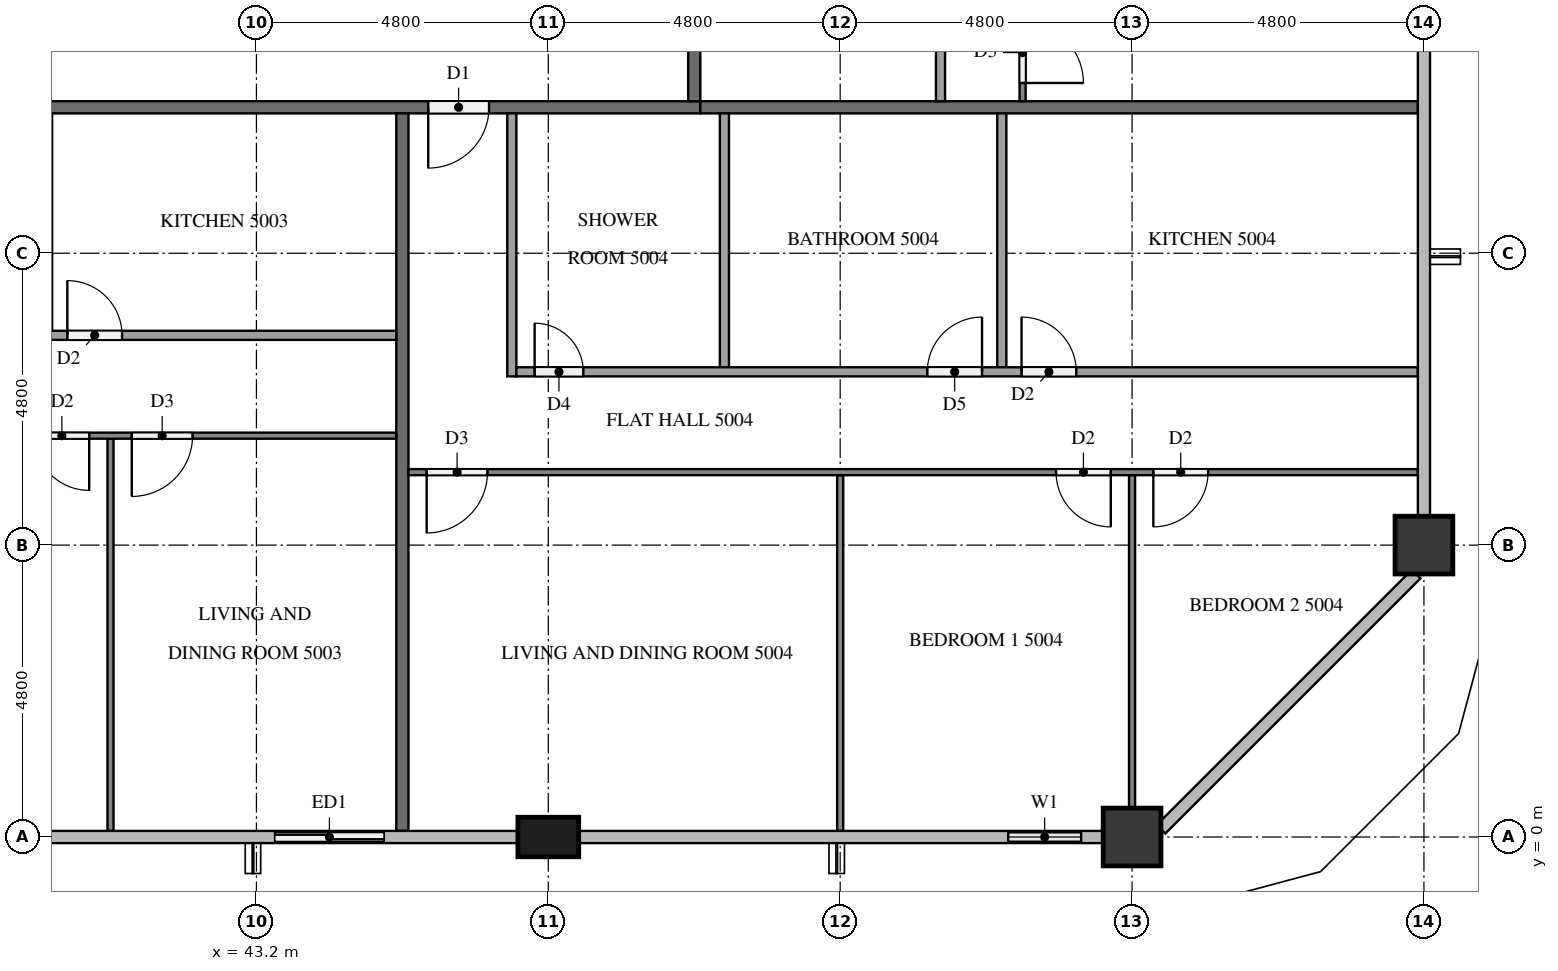
"""IFC4 building model, lengths in metres.
Left out: names, types, materials, properties, quantities, classifications, styles, units other than length and angle.
Written with IfcOpenShell. Run it as: python <this file> out.ifc"""

import sys

from ifc_helpers import new_model, si_unit, direction, frame, frame_2d, origin, origin_2d, place, context, subcontext, project, spatial, rectangle, extrude, element, fill, save


model = new_model("IFC4")
c1 = context("Model", 3, precision=1e-05, world=origin(), true_north=direction((0.0, 1.0)))
c2 = subcontext(c1, "Body", "Model", "MODEL_VIEW")
j1 = project(units=[si_unit("LENGTHUNIT", "METRE"), si_unit("PLANEANGLEUNIT", "RADIAN")], contexts=[c1])
p1 = place(None, origin())
s1 = spatial("IfcSite", under=j1, at=p1, CompositionType="ELEMENT")
p2 = place(p1, origin())
s2 = spatial("IfcBuilding", under=s1, at=p2, CompositionType="ELEMENT")
p3 = place(p2, frame((0.0, 0.0, 192.9)))
s3 = spatial("IfcBuildingStorey", under=s2, at=p3, CompositionType="ELEMENT", Elevation=192.9)
p4 = place(p3, frame((48.0, 0.0, 0.0), z_axis=(0.0, 0.0, 1.0), x_axis=(1.0, 0.0, 0.0)))
e1 = element("IfcColumn", 1, at=p4, inside=s3, PredefinedType="COLUMN", context=c2, shape_type="SweptSolid", body=[
    extrude(rectangle(XDim=1.0, YDim=0.65, at=origin_2d()), origin(), (0.0, 0.0, 1.0), 3.2),
])
for number, where, z_axis, x_axis in (
    (2, (57.6, 0.0, 0.0), (0.0, 0.0, 1.0), (1.0, 0.0, 0.0)),
    (3, (62.4, 4.8, 0.0), (0.0, 0.0, 1.0), (1.0, 0.0, 0.0)),
):
    element("IfcColumn", number, at=place(p3, frame(where, z_axis=z_axis, x_axis=x_axis)), inside=s3, PredefinedType="COLUMN", context=c2, shape_type="SweptSolid", body=[
        extrude(rectangle(XDim=0.95, YDim=0.95, at=origin_2d()), origin(), (0.0, 0.0, 1.0), 3.2),
    ])
p5 = place(p3, frame((43.2, 0.0, 0.0), z_axis=(0.0, 0.0, 1.0), x_axis=(1.0, 0.0, 0.0)))
e4 = element("IfcWall", 4, at=p5, inside=s3, PredefinedType="SOLIDWALL", context=c2, shape_type="SweptSolid", body=[
    extrude(rectangle(XDim=2.4, YDim=0.15, at=frame_2d((1.2, 0.0))), origin(), (0.0, 0.0, 1.0), 3.2),
])
p6 = place(p5, frame((0.3, 0.0, 0.0)))
e5 = element("IfcOpeningElement", 5, at=p6, cuts=e4, PredefinedType="OPENING", context=c2, shape_type="SweptSolid", body=[
    extrude(rectangle(XDim=1.8, YDim=2.4, at=frame_2d((0.9, 1.2))), frame((0.0, 0.085, 0.0), z_axis=(0.0, -1.0, 0.0), x_axis=(1.0, 0.0, 0.0)), (0.0, 0.0, 1.0), 0.17),
])
p7 = place(p3, frame((55.2, 0.0, 0.0), z_axis=(0.0, 0.0, 1.0), x_axis=(1.0, 0.0, 0.0)))
e6 = element("IfcWall", 6, at=p7, inside=s3, PredefinedType="SOLIDWALL", context=c2, shape_type="SweptSolid", body=[
    extrude(rectangle(XDim=1.925, YDim=0.15, at=frame_2d((0.962, 0.0))), origin(), (0.0, 0.0, 1.0), 3.2),
])
p8 = place(p7, frame((0.363, 0.0, 0.9)))
e7 = element("IfcOpeningElement", 7, at=p8, cuts=e6, PredefinedType="OPENING", context=c2, shape_type="SweptSolid", body=[
    extrude(rectangle(XDim=1.2, YDim=1.4, at=frame_2d((0.6, 0.7))), frame((0.0, 0.085, 0.0), z_axis=(0.0, -1.0, 0.0), x_axis=(1.0, 0.0, 0.0)), (0.0, 0.0, 1.0), 0.17),
])
p9 = place(p3, frame((50.5, 12.0, 0.0), z_axis=(0.0, 0.0, 1.0), x_axis=(-1.0, 0.0, 0.0)))
e8 = element("IfcWall", 8, at=p9, inside=s3, PredefinedType="PARTITIONING", context=c2, shape_type="SweptSolid", body=[
    extrude(rectangle(XDim=38.6, YDim=0.2, at=frame_2d((19.3, 0.0))), origin(), (0.0, 0.0, 1.0), 3.2),
])
p10 = place(p9, frame((31.725, 0.0, 0.0)))
e9 = element("IfcOpeningElement", 9, at=p10, cuts=e8, PredefinedType="OPENING", context=c2, shape_type="SweptSolid", body=[
    extrude(rectangle(XDim=1.0, YDim=2.1, at=frame_2d((0.5, 1.05))), frame((0.0, 0.11, 0.0), z_axis=(0.0, -1.0, 0.0), x_axis=(1.0, 0.0, 0.0)), (0.0, 0.0, 1.0), 0.22),
])
p11 = place(p9, frame((19.725, 0.0, 0.0)))
e10 = element("IfcOpeningElement", 10, at=p11, cuts=e8, PredefinedType="OPENING", context=c2, shape_type="SweptSolid", body=[
    extrude(rectangle(XDim=1.0, YDim=2.1, at=frame_2d((0.5, 1.05))), frame((0.0, 0.11, 0.0), z_axis=(0.0, -1.0, 0.0), x_axis=(1.0, 0.0, 0.0)), (0.0, 0.0, 1.0), 0.22),
])
p12 = place(p9, frame((17.875, 0.0, 0.0)))
e11 = element("IfcOpeningElement", 11, at=p12, cuts=e8, PredefinedType="OPENING", context=c2, shape_type="SweptSolid", body=[
    extrude(rectangle(XDim=1.0, YDim=2.1, at=frame_2d((0.5, 1.05))), frame((0.0, 0.11, 0.0), z_axis=(0.0, -1.0, 0.0), x_axis=(1.0, 0.0, 0.0)), (0.0, 0.0, 1.0), 0.22),
])
p13 = place(p9, frame((3.475, 0.0, 0.0)))
e12 = element("IfcOpeningElement", 12, at=p13, cuts=e8, PredefinedType="OPENING", context=c2, shape_type="SweptSolid", body=[
    extrude(rectangle(XDim=1.0, YDim=2.1, at=frame_2d((0.5, 1.05))), frame((0.0, 0.11, 0.0), z_axis=(0.0, -1.0, 0.0), x_axis=(1.0, 0.0, 0.0)), (0.0, 0.0, 1.0), 0.22),
])
p14 = place(p3, frame((50.4, 40.7, 0.0), z_axis=(0.0, 0.0, 1.0), x_axis=(0.0, -1.0, 0.0)))
e13 = element("IfcWall", 13, at=p14, inside=s3, PredefinedType="PARTITIONING", context=c2, shape_type="SweptSolid", body=[
    extrude(rectangle(XDim=28.6, YDim=0.2, at=frame_2d((14.3, 0.0))), origin(), (0.0, 0.0, 1.0), 3.2),
])
p15 = place(p14, frame((21.925, 0.0, 0.0)))
e14 = element("IfcOpeningElement", 14, at=p15, cuts=e13, PredefinedType="OPENING", context=c2, shape_type="SweptSolid", body=[
    extrude(rectangle(XDim=1.0, YDim=2.1, at=frame_2d((0.5, 1.05))), frame((0.0, 0.11, 0.0), z_axis=(0.0, -1.0, 0.0), x_axis=(1.0, 0.0, 0.0)), (0.0, 0.0, 1.0), 0.22),
])
p16 = place(p14, frame((20.075, 0.0, 0.0)))
e15 = element("IfcOpeningElement", 15, at=p16, cuts=e13, PredefinedType="OPENING", context=c2, shape_type="SweptSolid", body=[
    extrude(rectangle(XDim=1.0, YDim=2.1, at=frame_2d((0.5, 1.05))), frame((0.0, 0.11, 0.0), z_axis=(0.0, -1.0, 0.0), x_axis=(1.0, 0.0, 0.0)), (0.0, 0.0, 1.0), 0.22),
])
p17 = place(p14, frame((0.325, 0.0, 0.0)))
e16 = element("IfcOpeningElement", 16, at=p17, cuts=e13, PredefinedType="OPENING", context=c2, shape_type="SweptSolid", body=[
    extrude(rectangle(XDim=1.0, YDim=2.1, at=frame_2d((0.5, 1.05))), frame((0.0, 0.11, 0.0), z_axis=(0.0, -1.0, 0.0), x_axis=(1.0, 0.0, 0.0)), (0.0, 0.0, 1.0), 0.22),
])
p18 = place(p3, frame((45.6, 11.9, 0.0), z_axis=(0.0, 0.0, 1.0), x_axis=(0.0, -1.0, 0.0)))
e17 = element("IfcWall", 17, at=p18, inside=s3, PredefinedType="PARTITIONING", context=c2, shape_type="SweptSolid", body=[
    extrude(rectangle(XDim=11.8, YDim=0.2, at=frame_2d((5.9, 0.0))), origin(), (0.0, 0.0, 1.0), 3.2),
])
p19 = place(p3, frame((50.5, 12.0, 0.0), z_axis=(0.0, 0.0, 1.0), x_axis=(1.0, 0.0, 0.0)))
e18 = element("IfcWall", 18, at=p19, inside=s3, PredefinedType="PARTITIONING", context=c2, shape_type="SweptSolid", body=[
    extrude(rectangle(XDim=11.8, YDim=0.2, at=frame_2d((5.9, 0.0))), origin(), (0.0, 0.0, 1.0), 3.2),
])
p20 = place(p3, frame((40.8, 6.55, 0.0), z_axis=(0.0, 0.0, 1.0), x_axis=(0.0, -1.0, 0.0)))
e19 = element("IfcWall", 19, at=p20, inside=s3, PredefinedType="PARTITIONING", context=c2, shape_type="SweptSolid", body=[
    extrude(rectangle(XDim=6.45, YDim=0.1, at=frame_2d((3.225, 0.0))), origin(), (0.0, 0.0, 1.0), 3.2),
])
p21 = place(p3, frame((45.5, 6.6, 0.0), z_axis=(0.0, 0.0, 1.0), x_axis=(-1.0, 0.0, 0.0)))
e20 = element("IfcWall", 20, at=p21, inside=s3, PredefinedType="PARTITIONING", context=c2, shape_type="SweptSolid", body=[
    extrude(rectangle(XDim=14.2, YDim=0.1, at=frame_2d((7.1, 0.0))), origin(), (0.0, 0.0, 1.0), 3.2),
])
p22 = place(p21, frame((13.0, 0.0, 0.0)))
e21 = element("IfcOpeningElement", 21, at=p22, cuts=e20, PredefinedType="OPENING", context=c2, shape_type="SweptSolid", body=[
    extrude(rectangle(XDim=0.9, YDim=2.1, at=frame_2d((0.45, 1.05))), frame((0.0, 0.06, 0.0), z_axis=(0.0, -1.0, 0.0), x_axis=(1.0, 0.0, 0.0)), (0.0, 0.0, 1.0), 0.12),
])
p23 = place(p21, frame((5.05, 0.0, 0.0)))
e22 = element("IfcOpeningElement", 22, at=p23, cuts=e20, PredefinedType="OPENING", context=c2, shape_type="SweptSolid", body=[
    extrude(rectangle(XDim=0.9, YDim=2.1, at=frame_2d((0.45, 1.05))), frame((0.0, 0.06, 0.0), z_axis=(0.0, -1.0, 0.0), x_axis=(1.0, 0.0, 0.0)), (0.0, 0.0, 1.0), 0.12),
])
p24 = place(p21, frame((3.35, 0.0, 0.0)))
e23 = element("IfcOpeningElement", 23, at=p24, cuts=e20, PredefinedType="OPENING", context=c2, shape_type="SweptSolid", body=[
    extrude(rectangle(XDim=1.0, YDim=2.1, at=frame_2d((0.5, 1.05))), frame((0.0, 0.06, 0.0), z_axis=(0.0, -1.0, 0.0), x_axis=(1.0, 0.0, 0.0)), (0.0, 0.0, 1.0), 0.12),
])
p25 = place(p3, frame((33.075, 8.25, 0.0), z_axis=(0.0, 0.0, 1.0), x_axis=(1.0, 0.0, 0.0)))
e24 = element("IfcWall", 24, at=p25, inside=s3, PredefinedType="PARTITIONING", context=c2, shape_type="SweptSolid", body=[
    extrude(rectangle(XDim=12.425, YDim=0.15, at=frame_2d((6.212, 0.0))), origin(), (0.0, 0.0, 1.0), 3.2),
])
p26 = place(p25, frame((0.3, 0.0, 0.0)))
e25 = element("IfcOpeningElement", 25, at=p26, cuts=e24, PredefinedType="OPENING", context=c2, shape_type="SweptSolid", body=[
    extrude(rectangle(XDim=0.9, YDim=2.1, at=frame_2d((0.45, 1.05))), frame((0.0, 0.085, 0.0), z_axis=(0.0, -1.0, 0.0), x_axis=(1.0, 0.0, 0.0)), (0.0, 0.0, 1.0), 0.17),
])
p27 = place(p25, frame((5.565, 0.0, 0.0)))
e26 = element("IfcOpeningElement", 26, at=p27, cuts=e24, PredefinedType="OPENING", context=c2, shape_type="SweptSolid", body=[
    extrude(rectangle(XDim=0.8, YDim=2.1, at=frame_2d((0.4, 1.05))), frame((0.0, 0.085, 0.0), z_axis=(0.0, -1.0, 0.0), x_axis=(1.0, 0.0, 0.0)), (0.0, 0.0, 1.0), 0.17),
])
p28 = place(p25, frame((7.015, 0.0, 0.0)))
e27 = element("IfcOpeningElement", 27, at=p28, cuts=e24, PredefinedType="OPENING", context=c2, shape_type="SweptSolid", body=[
    extrude(rectangle(XDim=0.9, YDim=2.1, at=frame_2d((0.45, 1.05))), frame((0.0, 0.085, 0.0), z_axis=(0.0, -1.0, 0.0), x_axis=(1.0, 0.0, 0.0)), (0.0, 0.0, 1.0), 0.17),
])
p29 = place(p3, frame((52.8, 5.95, 0.0), z_axis=(0.0, 0.0, 1.0), x_axis=(0.0, -1.0, 0.0)))
e28 = element("IfcWall", 28, at=p29, inside=s3, PredefinedType="PARTITIONING", context=c2, shape_type="SweptSolid", body=[
    extrude(rectangle(XDim=5.85, YDim=0.1, at=frame_2d((2.925, 0.0))), origin(), (0.0, 0.0, 1.0), 3.2),
])
p30 = place(p3, frame((57.6, 5.95, 0.0), z_axis=(0.0, 0.0, 1.0), x_axis=(0.0, -1.0, 0.0)))
e29 = element("IfcWall", 29, at=p30, inside=s3, PredefinedType="PARTITIONING", context=c2, shape_type="SweptSolid", body=[
    extrude(rectangle(XDim=5.475, YDim=0.1, at=frame_2d((2.737, 0.0))), origin(), (0.0, 0.0, 1.0), 3.2),
])
p31 = place(p3, frame((62.3, 6.0, 0.0), z_axis=(0.0, 0.0, 1.0), x_axis=(-1.0, 0.0, 0.0)))
e30 = element("IfcWall", 30, at=p31, inside=s3, PredefinedType="PARTITIONING", context=c2, shape_type="SweptSolid", body=[
    extrude(rectangle(XDim=16.6, YDim=0.1, at=frame_2d((8.3, 0.0))), origin(), (0.0, 0.0, 1.0), 3.2),
])
p32 = place(p31, frame((15.3, 0.0, 0.0)))
e31 = element("IfcOpeningElement", 31, at=p32, cuts=e30, PredefinedType="OPENING", context=c2, shape_type="SweptSolid", body=[
    extrude(rectangle(XDim=1.0, YDim=2.1, at=frame_2d((0.5, 1.05))), frame((0.0, 0.06, 0.0), z_axis=(0.0, -1.0, 0.0), x_axis=(1.0, 0.0, 0.0)), (0.0, 0.0, 1.0), 0.12),
])
p33 = place(p31, frame((5.05, 0.0, 0.0)))
e32 = element("IfcOpeningElement", 32, at=p33, cuts=e30, PredefinedType="OPENING", context=c2, shape_type="SweptSolid", body=[
    extrude(rectangle(XDim=0.9, YDim=2.1, at=frame_2d((0.45, 1.05))), frame((0.0, 0.06, 0.0), z_axis=(0.0, -1.0, 0.0), x_axis=(1.0, 0.0, 0.0)), (0.0, 0.0, 1.0), 0.12),
])
p34 = place(p31, frame((3.45, 0.0, 0.0)))
e33 = element("IfcOpeningElement", 33, at=p34, cuts=e30, PredefinedType="OPENING", context=c2, shape_type="SweptSolid", body=[
    extrude(rectangle(XDim=0.9, YDim=2.1, at=frame_2d((0.45, 1.05))), frame((0.0, 0.06, 0.0), z_axis=(0.0, -1.0, 0.0), x_axis=(1.0, 0.0, 0.0)), (0.0, 0.0, 1.0), 0.12),
])
for number, where, z_axis, x_axis in (
    (34, (50.896, 11.9, 0.0), (0.0, 0.0, 1.0), (0.0, -1.0, 0.0)),
    (35, (55.458, 11.9, 0.0), (0.0, 0.0, 1.0), (0.0, -1.0, 0.0)),
):
    element("IfcWall", number, at=place(p3, frame(where, z_axis=z_axis, x_axis=x_axis)), inside=s3, PredefinedType="PARTITIONING", context=c2, shape_type="SweptSolid", body=[
        extrude(rectangle(XDim=4.175, YDim=0.15, at=frame_2d((2.087, 0.0))), origin(), (0.0, 0.0, 1.0), 3.2),
    ])
p35 = place(p3, frame((47.4, 11.9, 0.0), z_axis=(0.0, 0.0, 1.0), x_axis=(0.0, -1.0, 0.0)))
e36 = element("IfcWall", 36, at=p35, inside=s3, PredefinedType="PARTITIONING", context=c2, shape_type="SweptSolid", body=[
    extrude(rectangle(XDim=4.325, YDim=0.15, at=frame_2d((2.163, 0.0))), origin(), (0.0, 0.0, 1.0), 3.2),
])
p36 = place(p3, frame((47.475, 7.65, 0.0), z_axis=(0.0, 0.0, 1.0), x_axis=(1.0, 0.0, 0.0)))
e37 = element("IfcWall", 37, at=p36, inside=s3, PredefinedType="PARTITIONING", context=c2, shape_type="SweptSolid", body=[
    extrude(rectangle(XDim=14.825, YDim=0.15, at=frame_2d((7.413, 0.0))), origin(), (0.0, 0.0, 1.0), 3.2),
])
p37 = place(p36, frame((0.3, 0.0, 0.0)))
e38 = element("IfcOpeningElement", 38, at=p37, cuts=e37, PredefinedType="OPENING", context=c2, shape_type="SweptSolid", body=[
    extrude(rectangle(XDim=0.8, YDim=2.1, at=frame_2d((0.4, 1.05))), frame((0.0, 0.085, 0.0), z_axis=(0.0, -1.0, 0.0), x_axis=(1.0, 0.0, 0.0)), (0.0, 0.0, 1.0), 0.17),
])
p38 = place(p36, frame((6.758, 0.0, 0.0)))
e39 = element("IfcOpeningElement", 39, at=p38, cuts=e37, PredefinedType="OPENING", context=c2, shape_type="SweptSolid", body=[
    extrude(rectangle(XDim=0.9, YDim=2.1, at=frame_2d((0.45, 1.05))), frame((0.0, 0.085, 0.0), z_axis=(0.0, -1.0, 0.0), x_axis=(1.0, 0.0, 0.0)), (0.0, 0.0, 1.0), 0.17),
])
p39 = place(p36, frame((8.308, 0.0, 0.0)))
e40 = element("IfcOpeningElement", 40, at=p39, cuts=e37, PredefinedType="OPENING", context=c2, shape_type="SweptSolid", body=[
    extrude(rectangle(XDim=0.9, YDim=2.1, at=frame_2d((0.45, 1.05))), frame((0.0, 0.085, 0.0), z_axis=(0.0, -1.0, 0.0), x_axis=(1.0, 0.0, 0.0)), (0.0, 0.0, 1.0), 0.17),
])
p40 = place(p3, frame((55.8, 19.1, 0.0), z_axis=(0.0, 0.0, 1.0), x_axis=(0.0, -1.0, 0.0)))
e41 = element("IfcWall", 41, at=p40, inside=s3, PredefinedType="PARTITIONING", context=c2, shape_type="SweptSolid", body=[
    extrude(rectangle(XDim=7.0, YDim=0.1, at=frame_2d((3.5, 0.0))), origin(), (0.0, 0.0, 1.0), 3.2),
])
p41 = place(p40, frame((5.7, 0.0, 0.0)))
e42 = element("IfcOpeningElement", 42, at=p41, cuts=e41, PredefinedType="OPENING", context=c2, shape_type="SweptSolid", body=[
    extrude(rectangle(XDim=1.0, YDim=2.1, at=frame_2d((0.5, 1.05))), frame((0.0, 0.06, 0.0), z_axis=(0.0, -1.0, 0.0), x_axis=(1.0, 0.0, 0.0)), (0.0, 0.0, 1.0), 0.12),
])
p42 = place(p3, frame((54.45, 12.1, 0.0), z_axis=(0.0, 0.0, 1.0), x_axis=(0.0, 1.0, 0.0)))
e43 = element("IfcWall", 43, at=p42, inside=s3, PredefinedType="PARTITIONING", context=c2, shape_type="SweptSolid", body=[
    extrude(rectangle(XDim=5.225, YDim=0.15, at=frame_2d((2.612, 0.0))), origin(), (0.0, 0.0, 1.0), 3.2),
])
p43 = place(p42, frame((3.46, 0.0, 0.0)))
e44 = element("IfcOpeningElement", 44, at=p43, cuts=e43, PredefinedType="OPENING", context=c2, shape_type="SweptSolid", body=[
    extrude(rectangle(XDim=0.8, YDim=2.1, at=frame_2d((0.4, 1.05))), frame((0.0, 0.085, 0.0), z_axis=(0.0, -1.0, 0.0), x_axis=(1.0, 0.0, 0.0)), (0.0, 0.0, 1.0), 0.17),
])
p44 = place(p42, frame((1.91, 0.0, 0.0)))
e45 = element("IfcOpeningElement", 45, at=p44, cuts=e43, PredefinedType="OPENING", context=c2, shape_type="SweptSolid", body=[
    extrude(rectangle(XDim=0.9, YDim=2.1, at=frame_2d((0.45, 1.05))), frame((0.0, 0.085, 0.0), z_axis=(0.0, -1.0, 0.0), x_axis=(1.0, 0.0, 0.0)), (0.0, 0.0, 1.0), 0.17),
])
p45 = place(p6, origin())
e46 = element("IfcDoor", 46, at=p45, inside=s3, OperationType="SLIDING_TO_LEFT", PredefinedType="DOOR", context=c2, shape_type="SweptSolid", body=[
    extrude(rectangle(XDim=1.8, YDim=2.4, at=frame_2d((0.9, 1.2))), frame((0.0, 0.025, 0.0), z_axis=(0.0, -1.0, 0.0), x_axis=(1.0, 0.0, 0.0)), (0.0, 0.0, 1.0), 0.05),
])
fill(e5, e46)
p46 = place(p8, origin())
e47 = element("IfcWindow", 47, at=p46, inside=s3, PartitioningType="SINGLE_PANEL", PredefinedType="WINDOW", context=c2, shape_type="SweptSolid", body=[
    extrude(rectangle(XDim=1.2, YDim=1.4, at=frame_2d((0.6, 0.7))), frame((0.0, 0.03, 0.0), z_axis=(0.0, -1.0, 0.0), x_axis=(1.0, 0.0, 0.0)), (0.0, 0.0, 1.0), 0.06),
])
fill(e7, e47)
p47 = place(p13, origin())
e48 = element("IfcDoor", 48, at=p47, inside=s3, OperationType="SINGLE_SWING_RIGHT", PredefinedType="DOOR", context=c2, shape_type="SweptSolid", body=[
    extrude(rectangle(XDim=1.0, YDim=2.1, at=frame_2d((0.5, 1.05))), frame((0.0, 0.025, 0.0), z_axis=(0.0, -1.0, 0.0), x_axis=(1.0, 0.0, 0.0)), (0.0, 0.0, 1.0), 0.05),
])
fill(e12, e48)
p48 = place(p23, origin())
e49 = element("IfcDoor", 49, at=p48, inside=s3, OperationType="SINGLE_SWING_LEFT", PredefinedType="DOOR", context=c2, shape_type="SweptSolid", body=[
    extrude(rectangle(XDim=0.9, YDim=2.1, at=frame_2d((0.45, 1.05))), frame((0.0, 0.025, 0.0), z_axis=(0.0, -1.0, 0.0), x_axis=(1.0, 0.0, 0.0)), (0.0, 0.0, 1.0), 0.05),
])
fill(e22, e49)
p49 = place(p24, origin())
e50 = element("IfcDoor", 50, at=p49, inside=s3, OperationType="SINGLE_SWING_RIGHT", PredefinedType="DOOR", context=c2, shape_type="SweptSolid", body=[
    extrude(rectangle(XDim=1.0, YDim=2.1, at=frame_2d((0.5, 1.05))), frame((0.0, 0.025, 0.0), z_axis=(0.0, -1.0, 0.0), x_axis=(1.0, 0.0, 0.0)), (0.0, 0.0, 1.0), 0.05),
])
fill(e23, e50)
p50 = place(p28, origin())
e51 = element("IfcDoor", 51, at=p50, inside=s3, OperationType="SINGLE_SWING_LEFT", PredefinedType="DOOR", context=c2, shape_type="SweptSolid", body=[
    extrude(rectangle(XDim=0.9, YDim=2.1, at=frame_2d((0.45, 1.05))), frame((0.0, 0.025, 0.0), z_axis=(0.0, -1.0, 0.0), x_axis=(1.0, 0.0, 0.0)), (0.0, 0.0, 1.0), 0.05),
])
fill(e27, e51)
p51 = place(p32, origin())
e52 = element("IfcDoor", 52, at=p51, inside=s3, OperationType="SINGLE_SWING_RIGHT", PredefinedType="DOOR", context=c2, shape_type="SweptSolid", body=[
    extrude(rectangle(XDim=1.0, YDim=2.1, at=frame_2d((0.5, 1.05))), frame((0.0, 0.025, 0.0), z_axis=(0.0, -1.0, 0.0), x_axis=(1.0, 0.0, 0.0)), (0.0, 0.0, 1.0), 0.05),
])
fill(e31, e52)
p52 = place(p33, origin())
e53 = element("IfcDoor", 53, at=p52, inside=s3, OperationType="SINGLE_SWING_LEFT", PredefinedType="DOOR", context=c2, shape_type="SweptSolid", body=[
    extrude(rectangle(XDim=0.9, YDim=2.1, at=frame_2d((0.45, 1.05))), frame((0.0, 0.025, 0.0), z_axis=(0.0, -1.0, 0.0), x_axis=(1.0, 0.0, 0.0)), (0.0, 0.0, 1.0), 0.05),
])
fill(e32, e53)
p53 = place(p34, origin())
e54 = element("IfcDoor", 54, at=p53, inside=s3, OperationType="SINGLE_SWING_RIGHT", PredefinedType="DOOR", context=c2, shape_type="SweptSolid", body=[
    extrude(rectangle(XDim=0.9, YDim=2.1, at=frame_2d((0.45, 1.05))), frame((0.0, 0.025, 0.0), z_axis=(0.0, -1.0, 0.0), x_axis=(1.0, 0.0, 0.0)), (0.0, 0.0, 1.0), 0.05),
])
fill(e33, e54)
p54 = place(p37, origin())
e55 = element("IfcDoor", 55, at=p54, inside=s3, OperationType="SINGLE_SWING_LEFT", PredefinedType="DOOR", context=c2, shape_type="SweptSolid", body=[
    extrude(rectangle(XDim=0.8, YDim=2.1, at=frame_2d((0.4, 1.05))), frame((0.0, 0.025, 0.0), z_axis=(0.0, -1.0, 0.0), x_axis=(1.0, 0.0, 0.0)), (0.0, 0.0, 1.0), 0.05),
])
fill(e38, e55)
p55 = place(p38, origin())
e56 = element("IfcDoor", 56, at=p55, inside=s3, OperationType="SINGLE_SWING_RIGHT", PredefinedType="DOOR", context=c2, shape_type="SweptSolid", body=[
    extrude(rectangle(XDim=0.9, YDim=2.1, at=frame_2d((0.45, 1.05))), frame((0.0, 0.025, 0.0), z_axis=(0.0, -1.0, 0.0), x_axis=(1.0, 0.0, 0.0)), (0.0, 0.0, 1.0), 0.05),
])
fill(e39, e56)
p56 = place(p39, origin())
e57 = element("IfcDoor", 57, at=p56, inside=s3, OperationType="SINGLE_SWING_LEFT", PredefinedType="DOOR", context=c2, shape_type="SweptSolid", body=[
    extrude(rectangle(XDim=0.9, YDim=2.1, at=frame_2d((0.45, 1.05))), frame((0.0, 0.025, 0.0), z_axis=(0.0, -1.0, 0.0), x_axis=(1.0, 0.0, 0.0)), (0.0, 0.0, 1.0), 0.05),
])
fill(e40, e57)
p57 = place(p41, origin())
e58 = element("IfcDoor", 58, at=p57, inside=s3, OperationType="SINGLE_SWING_RIGHT", PredefinedType="DOOR", context=c2, shape_type="SweptSolid", body=[
    extrude(rectangle(XDim=1.0, YDim=2.1, at=frame_2d((0.5, 1.05))), frame((0.0, 0.025, 0.0), z_axis=(0.0, -1.0, 0.0), x_axis=(1.0, 0.0, 0.0)), (0.0, 0.0, 1.0), 0.05),
])
fill(e42, e58)
save(model, sys.argv[1])
